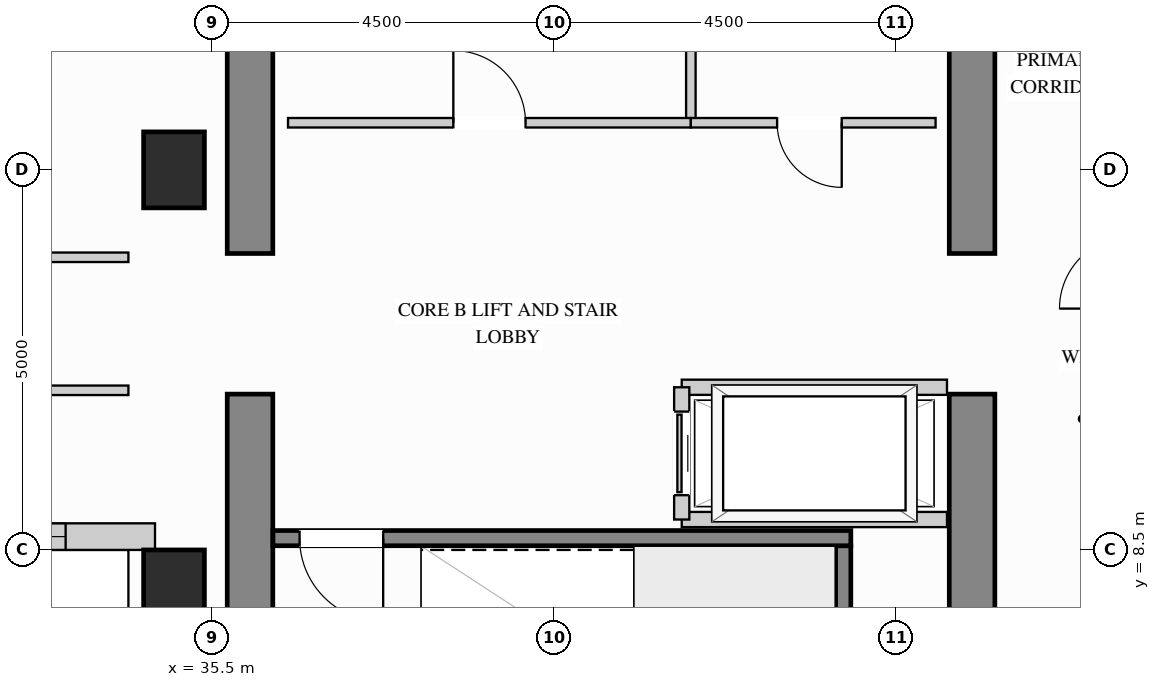
"""IFC4 building model, lengths in metres.
Left out: names, types, materials, properties, quantities, classifications, styles, units other than length and angle.
Written with IfcOpenShell. Run it as: python <this file> out.ifc"""

import sys

from ifc_helpers import new_model, si_unit, direction, frame, frame_2d, origin, origin_2d, place, context, subcontext, project, spatial, rectangle, extrude, source, transform, mapped, element, fill, save


model = new_model("IFC4")
c1 = context("Model", 3, precision=1e-05, world=origin(), true_north=direction((0.0, 1.0)))
c2 = subcontext(c1, "Body", "Model", "MODEL_VIEW")
j1 = project(units=[si_unit("LENGTHUNIT", "METRE"), si_unit("PLANEANGLEUNIT", "RADIAN")], contexts=[c1])
p1 = place(None, origin())
s1 = spatial("IfcSite", under=j1, at=p1, CompositionType="ELEMENT")
p2 = place(p1, origin())
s2 = spatial("IfcBuilding", under=s1, at=p2, CompositionType="ELEMENT")
p3 = place(p2, frame((0.0, 0.0, 164.7)))
s3 = spatial("IfcBuildingStorey", under=s2, at=p3, CompositionType="ELEMENT", Elevation=164.7)
m1 = source(origin(), c2, "Body", "SweptSolid", [
    extrude(rectangle(XDim=0.8, YDim=1.0, at=origin_2d()), origin(), (0.0, 0.0, 1.0), 3.4),
])
for number, where, z_axis, x_axis in (
    (1, (35.0, 13.5, 0.0), (0.0, 0.0, 1.0), (1.0, 0.0, 0.0)),
    (2, (35.0, 8.0, 0.0), (0.0, 0.0, 1.0), (1.0, 0.0, 0.0)),
):
    element("IfcColumn", number, at=place(p3, frame(where, z_axis=z_axis, x_axis=x_axis)), inside=s3, PredefinedType="COLUMN", context=c2, shape_type="MappedRepresentation", body=[
        mapped(m1, transform((0.0, 0.0, 0.0), x_axis=(1.0, 0.0, 0.0), y_axis=(0.0, 1.0, 0.0), z_axis=(0.0, 0.0, 1.0))),
    ])
m2 = source(origin(), c2, "Body", "SweptSolid", [
    extrude(rectangle(XDim=5.75, YDim=0.6, at=frame_2d((2.875, 0.0))), origin(), (0.0, 0.0, 1.0), 3.4),
])
p4 = place(p3, frame((45.5, 4.8, 0.0), z_axis=(0.0, 0.0, 1.0), x_axis=(0.0, 1.0, 0.0)))
e3 = element("IfcWall", 3, at=p4, inside=s3, PredefinedType="SHEAR", context=c2, shape_type="MappedRepresentation", body=[
    mapped(m2, transform((0.0, 0.0, 0.0), x_axis=(1.0, 0.0, 0.0), y_axis=(0.0, 1.0, 0.0), z_axis=(0.0, 0.0, 1.0))),
])
m3 = source(origin(), c2, "Body", "SweptSolid", [
    extrude(rectangle(XDim=3.8, YDim=0.6, at=frame_2d((1.9, 0.0))), origin(), (0.0, 0.0, 1.0), 3.4),
])
p5 = place(p3, frame((45.5, 12.4, 0.0), z_axis=(0.0, 0.0, 1.0), x_axis=(0.0, 1.0, 0.0)))
e4 = element("IfcWall", 4, at=p5, inside=s3, PredefinedType="SHEAR", context=c2, shape_type="MappedRepresentation", body=[
    mapped(m3, transform((0.0, 0.0, 0.0), x_axis=(1.0, 0.0, 0.0), y_axis=(0.0, 1.0, 0.0), z_axis=(0.0, 0.0, 1.0))),
])
p6 = place(p3, frame((36.0, 4.8, 0.0), z_axis=(0.0, 0.0, 1.0), x_axis=(0.0, 1.0, 0.0)))
e5 = element("IfcWall", 5, at=p6, inside=s3, PredefinedType="SHEAR", context=c2, shape_type="MappedRepresentation", body=[
    mapped(m2, transform((0.0, 0.0, 0.0), x_axis=(1.0, 0.0, 0.0), y_axis=(0.0, 1.0, 0.0), z_axis=(0.0, 0.0, 1.0))),
])
p7 = place(p3, frame((36.0, 12.4, 0.0), z_axis=(0.0, 0.0, 1.0), x_axis=(0.0, 1.0, 0.0)))
e6 = element("IfcWall", 6, at=p7, inside=s3, PredefinedType="SHEAR", context=c2, shape_type="MappedRepresentation", body=[
    mapped(m3, transform((0.0, 0.0, 0.0), x_axis=(1.0, 0.0, 0.0), y_axis=(0.0, 1.0, 0.0), z_axis=(0.0, 0.0, 1.0))),
])
p8 = place(p3, frame((30.898, 8.675, 0.0), z_axis=(0.0, 0.0, 1.0), x_axis=(1.0, 0.0, 0.0)))
e7 = element("IfcWall", 7, at=p8, inside=s3, PredefinedType="SOLIDWALL", context=c2, shape_type="SweptSolid", body=[
    extrude(rectangle(XDim=3.852, YDim=0.35, at=frame_2d((1.926, 0.0))), origin(), (0.0, 0.0, 1.0), 3.385),
])
p9 = place(p8, frame((1.176, 0.0, 0.78)))
e8 = element("IfcOpeningElement", 8, at=p9, cuts=e7, PredefinedType="OPENING", context=c2, shape_type="SweptSolid", body=[
    extrude(rectangle(XDim=1.5, YDim=2.0, at=frame_2d((0.75, 1.0))), frame((0.0, 0.185, 0.0), z_axis=(0.0, -1.0, 0.0), x_axis=(1.0, 0.0, 0.0)), (0.0, 0.0, 1.0), 0.37),
])
m4 = source(origin(), c2, "Body", "SweptSolid", [
    extrude(rectangle(XDim=1.93, YDim=0.125, at=frame_2d((0.965, 0.0))), origin(), (0.0, 0.0, 1.0), 3.385),
])
p10 = place(p3, frame((41.8, 14.12, 0.0), z_axis=(0.0, 0.0, 1.0), x_axis=(0.0, 1.0, 0.0)))
e9 = element("IfcWall", 9, at=p10, inside=s3, PredefinedType="PARTITIONING", context=c2, shape_type="MappedRepresentation", body=[
    mapped(m4, transform((0.0, 0.0, 0.0), x_axis=(1.0, 0.0, 0.0), y_axis=(0.0, 1.0, 0.0), z_axis=(0.0, 0.0, 1.0))),
])
p11 = place(p3, frame((36.5, 14.12, 0.0), z_axis=(0.0, 0.0, 1.0), x_axis=(1.0, 0.0, 0.0)))
e10 = element("IfcWall", 10, at=p11, inside=s3, PredefinedType="PARTITIONING", context=c2, shape_type="SweptSolid", body=[
    extrude(rectangle(XDim=5.3, YDim=0.125, at=frame_2d((2.65, 0.0))), origin(), (0.0, 0.0, 1.0), 3.385),
])
p12 = place(p11, frame((2.175, 0.0, 0.0)))
e11 = element("IfcOpeningElement", 11, at=p12, cuts=e10, PredefinedType="OPENING", context=c2, shape_type="SweptSolid", body=[
    extrude(rectangle(XDim=0.95, YDim=2.15, at=frame_2d((0.475, 1.075))), frame((0.0, 0.073, 0.0), z_axis=(0.0, -1.0, 0.0), x_axis=(1.0, 0.0, 0.0)), (0.0, 0.0, 1.0), 0.145),
])
p13 = place(p3, frame((41.8, 14.12, 0.0), z_axis=(0.0, 0.0, 1.0), x_axis=(1.0, 0.0, 0.0)))
e12 = element("IfcWall", 12, at=p13, inside=s3, PredefinedType="PARTITIONING", context=c2, shape_type="SweptSolid", body=[
    extrude(rectangle(XDim=3.22, YDim=0.125, at=frame_2d((1.61, 0.0))), origin(), (0.0, 0.0, 1.0), 3.385),
])
p14 = place(p13, frame((1.135, 0.0, 0.0)))
e13 = element("IfcOpeningElement", 13, at=p14, cuts=e12, PredefinedType="OPENING", context=c2, shape_type="SweptSolid", body=[
    extrude(rectangle(XDim=0.85, YDim=2.1, at=frame_2d((0.425, 1.05))), frame((0.0, 0.073, 0.0), z_axis=(0.0, -1.0, 0.0), x_axis=(1.0, 0.0, 0.0)), (0.0, 0.0, 1.0), 0.145),
])
p15 = place(p3, frame((29.85, 12.35, 0.0), z_axis=(0.0, 0.0, 1.0), x_axis=(1.0, 0.0, 0.0)))
e14 = element("IfcWall", 14, at=p15, inside=s3, PredefinedType="PARTITIONING", context=c2, shape_type="SweptSolid", body=[
    extrude(rectangle(XDim=4.55, YDim=0.125, at=frame_2d((2.275, 0.0))), origin(), (0.0, 0.0, 1.0), 3.385),
])
p16 = place(p15, frame((1.8, 0.0, 0.0)))
e15 = element("IfcOpeningElement", 15, at=p16, cuts=e14, PredefinedType="OPENING", context=c2, shape_type="SweptSolid", body=[
    extrude(rectangle(XDim=0.95, YDim=2.15, at=frame_2d((0.475, 1.075))), frame((0.0, 0.073, 0.0), z_axis=(0.0, -1.0, 0.0), x_axis=(1.0, 0.0, 0.0)), (0.0, 0.0, 1.0), 0.145),
])
p17 = place(p3, frame((19.5, 10.6, 0.0), z_axis=(0.0, 0.0, 1.0), x_axis=(1.0, 0.0, 0.0)))
e16 = element("IfcWall", 16, at=p17, inside=s3, PredefinedType="PARTITIONING", context=c2, shape_type="SweptSolid", body=[
    extrude(rectangle(XDim=14.9, YDim=0.125, at=frame_2d((7.45, 0.0))), origin(), (0.0, 0.0, 1.0), 3.385),
])
p18 = place(p17, frame((6.975, 0.0, 0.0)))
e17 = element("IfcOpeningElement", 17, at=p18, cuts=e16, PredefinedType="OPENING", context=c2, shape_type="SweptSolid", body=[
    extrude(rectangle(XDim=0.95, YDim=2.15, at=frame_2d((0.475, 1.075))), frame((0.0, 0.073, 0.0), z_axis=(0.0, -1.0, 0.0), x_axis=(1.0, 0.0, 0.0)), (0.0, 0.0, 1.0), 0.145),
])
m5 = source(origin(), c2, "Body", "SweptSolid", [
    extrude(rectangle(XDim=3.49, YDim=0.2, at=frame_2d((1.745, 0.0))), origin(), (0.0, 0.0, 1.0), 3.385),
])
for number, where, z_axis, x_axis in (
    (18, (41.68, 10.64, 0.0), (0.0, 0.0, 1.0), (1.0, 0.0, 0.0)),
    (19, (41.68, 8.9, 0.0), (0.0, 0.0, 1.0), (1.0, 0.0, 0.0)),
):
    element("IfcWall", number, at=place(p3, frame(where, z_axis=z_axis, x_axis=x_axis)), inside=s3, PredefinedType="PARTITIONING", context=c2, shape_type="MappedRepresentation", body=[
        mapped(m5, transform((0.0, 0.0, 0.0), x_axis=(1.0, 0.0, 0.0), y_axis=(0.0, 1.0, 0.0), z_axis=(0.0, 0.0, 1.0))),
    ])
p19 = place(p3, frame((41.68, 8.9, 0.0), z_axis=(0.0, 0.0, 1.0), x_axis=(0.0, 1.0, 0.0)))
e20 = element("IfcWall", 20, at=p19, inside=s3, PredefinedType="PARTITIONING", context=c2, shape_type="SweptSolid", body=[
    extrude(rectangle(XDim=1.74, YDim=0.2, at=frame_2d((0.87, 0.0))), origin(), (0.0, 0.0, 1.0), 3.385),
])
p20 = place(p19, frame((0.32, 0.0, 0.0)))
e21 = element("IfcOpeningElement", 21, at=p20, cuts=e20, PredefinedType="OPENING", context=c2, shape_type="SweptSolid", body=[
    extrude(rectangle(XDim=1.1, YDim=2.2, at=frame_2d((0.55, 1.1))), frame((0.0, 0.11, 0.0), z_axis=(0.0, -1.0, 0.0), x_axis=(1.0, 0.0, 0.0)), (0.0, 0.0, 1.0), 0.22),
])
m6 = source(origin(), c2, "Body", "SweptSolid", [
    extrude(rectangle(XDim=3.753, YDim=0.2, at=frame_2d((1.876, 0.0))), origin(), (0.0, 0.0, 1.0), 3.4),
])
p21 = place(p3, frame((43.805, 4.802, 0.0), z_axis=(0.0, 0.0, 1.0), x_axis=(0.0, 1.0, 0.0)))
e22 = element("IfcWall", 22, at=p21, inside=s3, PredefinedType="SHEAR", context=c2, shape_type="MappedRepresentation", body=[
    mapped(m6, transform((0.0, 0.0, 0.0), x_axis=(1.0, 0.0, 0.0), y_axis=(0.0, 1.0, 0.0), z_axis=(0.0, 0.0, 1.0))),
])
p22 = place(p3, frame((36.302, 8.655, 0.0), z_axis=(0.0, 0.0, 1.0), x_axis=(1.0, 0.0, 0.0)))
e23 = element("IfcWall", 23, at=p22, inside=s3, PredefinedType="SHEAR", context=c2, shape_type="SweptSolid", body=[
    extrude(rectangle(XDim=7.603, YDim=0.2, at=frame_2d((3.802, 0.0))), origin(), (0.0, 0.0, 1.0), 3.4),
])
p23 = place(p22, frame((0.35, 0.0, 0.0)))
e24 = element("IfcOpeningElement", 24, at=p23, cuts=e23, PredefinedType="OPENING", context=c2, shape_type="SweptSolid", body=[
    extrude(rectangle(XDim=1.1, YDim=2.15, at=frame_2d((0.55, 1.075))), frame((0.0, 0.11, 0.0), z_axis=(0.0, -1.0, 0.0), x_axis=(1.0, 0.0, 0.0)), (0.0, 0.0, 1.0), 0.22),
])
m7 = source(origin(), c2, "Body", "SweptSolid", [
    extrude(rectangle(XDim=1.1, YDim=2.2, at=frame_2d((0.55, 1.1))), frame((0.0, 0.025, 0.0), z_axis=(0.0, -1.0, 0.0), x_axis=(1.0, 0.0, 0.0)), (0.0, 0.0, 1.0), 0.05),
])
p24 = place(p20, origin())
e25 = element("IfcDoor", 25, at=p24, inside=s3, OperationType="SLIDING_TO_LEFT", PredefinedType="DOOR", context=c2, shape_type="MappedRepresentation", body=[
    mapped(m7, transform((0.0, 0.0, 0.0), x_axis=(1.0, 0.0, 0.0), y_axis=(0.0, 1.0, 0.0), z_axis=(0.0, 0.0, 1.0))),
])
fill(e21, e25)
m8 = source(origin(), c2, "Body", "SweptSolid", [
    extrude(rectangle(XDim=0.95, YDim=2.15, at=frame_2d((0.475, 1.075))), frame((0.0, 0.025, 0.0), z_axis=(0.0, -1.0, 0.0), x_axis=(1.0, 0.0, 0.0)), (0.0, 0.0, 1.0), 0.05),
])
p25 = place(p12, origin())
e26 = element("IfcDoor", 26, at=p25, inside=s3, OperationType="SINGLE_SWING_LEFT", PredefinedType="DOOR", context=c2, shape_type="MappedRepresentation", body=[
    mapped(m8, transform((0.0, 0.0, 0.0), x_axis=(1.0, 0.0, 0.0), y_axis=(0.0, 1.0, 0.0), z_axis=(0.0, 0.0, 1.0))),
])
fill(e11, e26)
m9 = source(origin(), c2, "Body", "SweptSolid", [
    extrude(rectangle(XDim=0.85, YDim=2.1, at=frame_2d((0.425, 1.05))), frame((0.0, 0.025, 0.0), z_axis=(0.0, -1.0, 0.0), x_axis=(1.0, 0.0, 0.0)), (0.0, 0.0, 1.0), 0.05),
])
p26 = place(p14, origin())
e27 = element("IfcDoor", 27, at=p26, inside=s3, OperationType="SINGLE_SWING_RIGHT", PredefinedType="DOOR", context=c2, shape_type="MappedRepresentation", body=[
    mapped(m9, transform((0.0, 0.0, 0.0), x_axis=(1.0, 0.0, 0.0), y_axis=(0.0, 1.0, 0.0), z_axis=(0.0, 0.0, 1.0))),
])
fill(e13, e27)
m10 = source(origin(), c2, "Body", "SweptSolid", [
    extrude(rectangle(XDim=1.1, YDim=2.15, at=frame_2d((0.55, 1.075))), frame((0.0, 0.025, 0.0), z_axis=(0.0, -1.0, 0.0), x_axis=(1.0, 0.0, 0.0)), (0.0, 0.0, 1.0), 0.05),
])
p27 = place(p23, origin())
e28 = element("IfcDoor", 28, at=p27, inside=s3, OperationType="SINGLE_SWING_RIGHT", PredefinedType="DOOR", context=c2, shape_type="MappedRepresentation", body=[
    mapped(m10, transform((0.0, 0.0, 0.0), x_axis=(1.0, 0.0, 0.0), y_axis=(0.0, 1.0, 0.0), z_axis=(0.0, 0.0, 1.0))),
])
fill(e24, e28)
m11 = source(origin(), c2, "Body", "SweptSolid", [
    extrude(rectangle(XDim=1.5, YDim=2.0, at=frame_2d((0.75, 1.0))), frame((0.0, 0.03, 0.0), z_axis=(0.0, -1.0, 0.0), x_axis=(1.0, 0.0, 0.0)), (0.0, 0.0, 1.0), 0.06),
])
p28 = place(p9, origin())
e29 = element("IfcWindow", 29, at=p28, inside=s3, PartitioningType="SINGLE_PANEL", PredefinedType="WINDOW", context=c2, shape_type="MappedRepresentation", body=[
    mapped(m11, transform((0.0, 0.0, 0.0), x_axis=(1.0, 0.0, 0.0), y_axis=(0.0, 1.0, 0.0), z_axis=(0.0, 0.0, 1.0))),
])
fill(e8, e29)
save(model, sys.argv[1])
